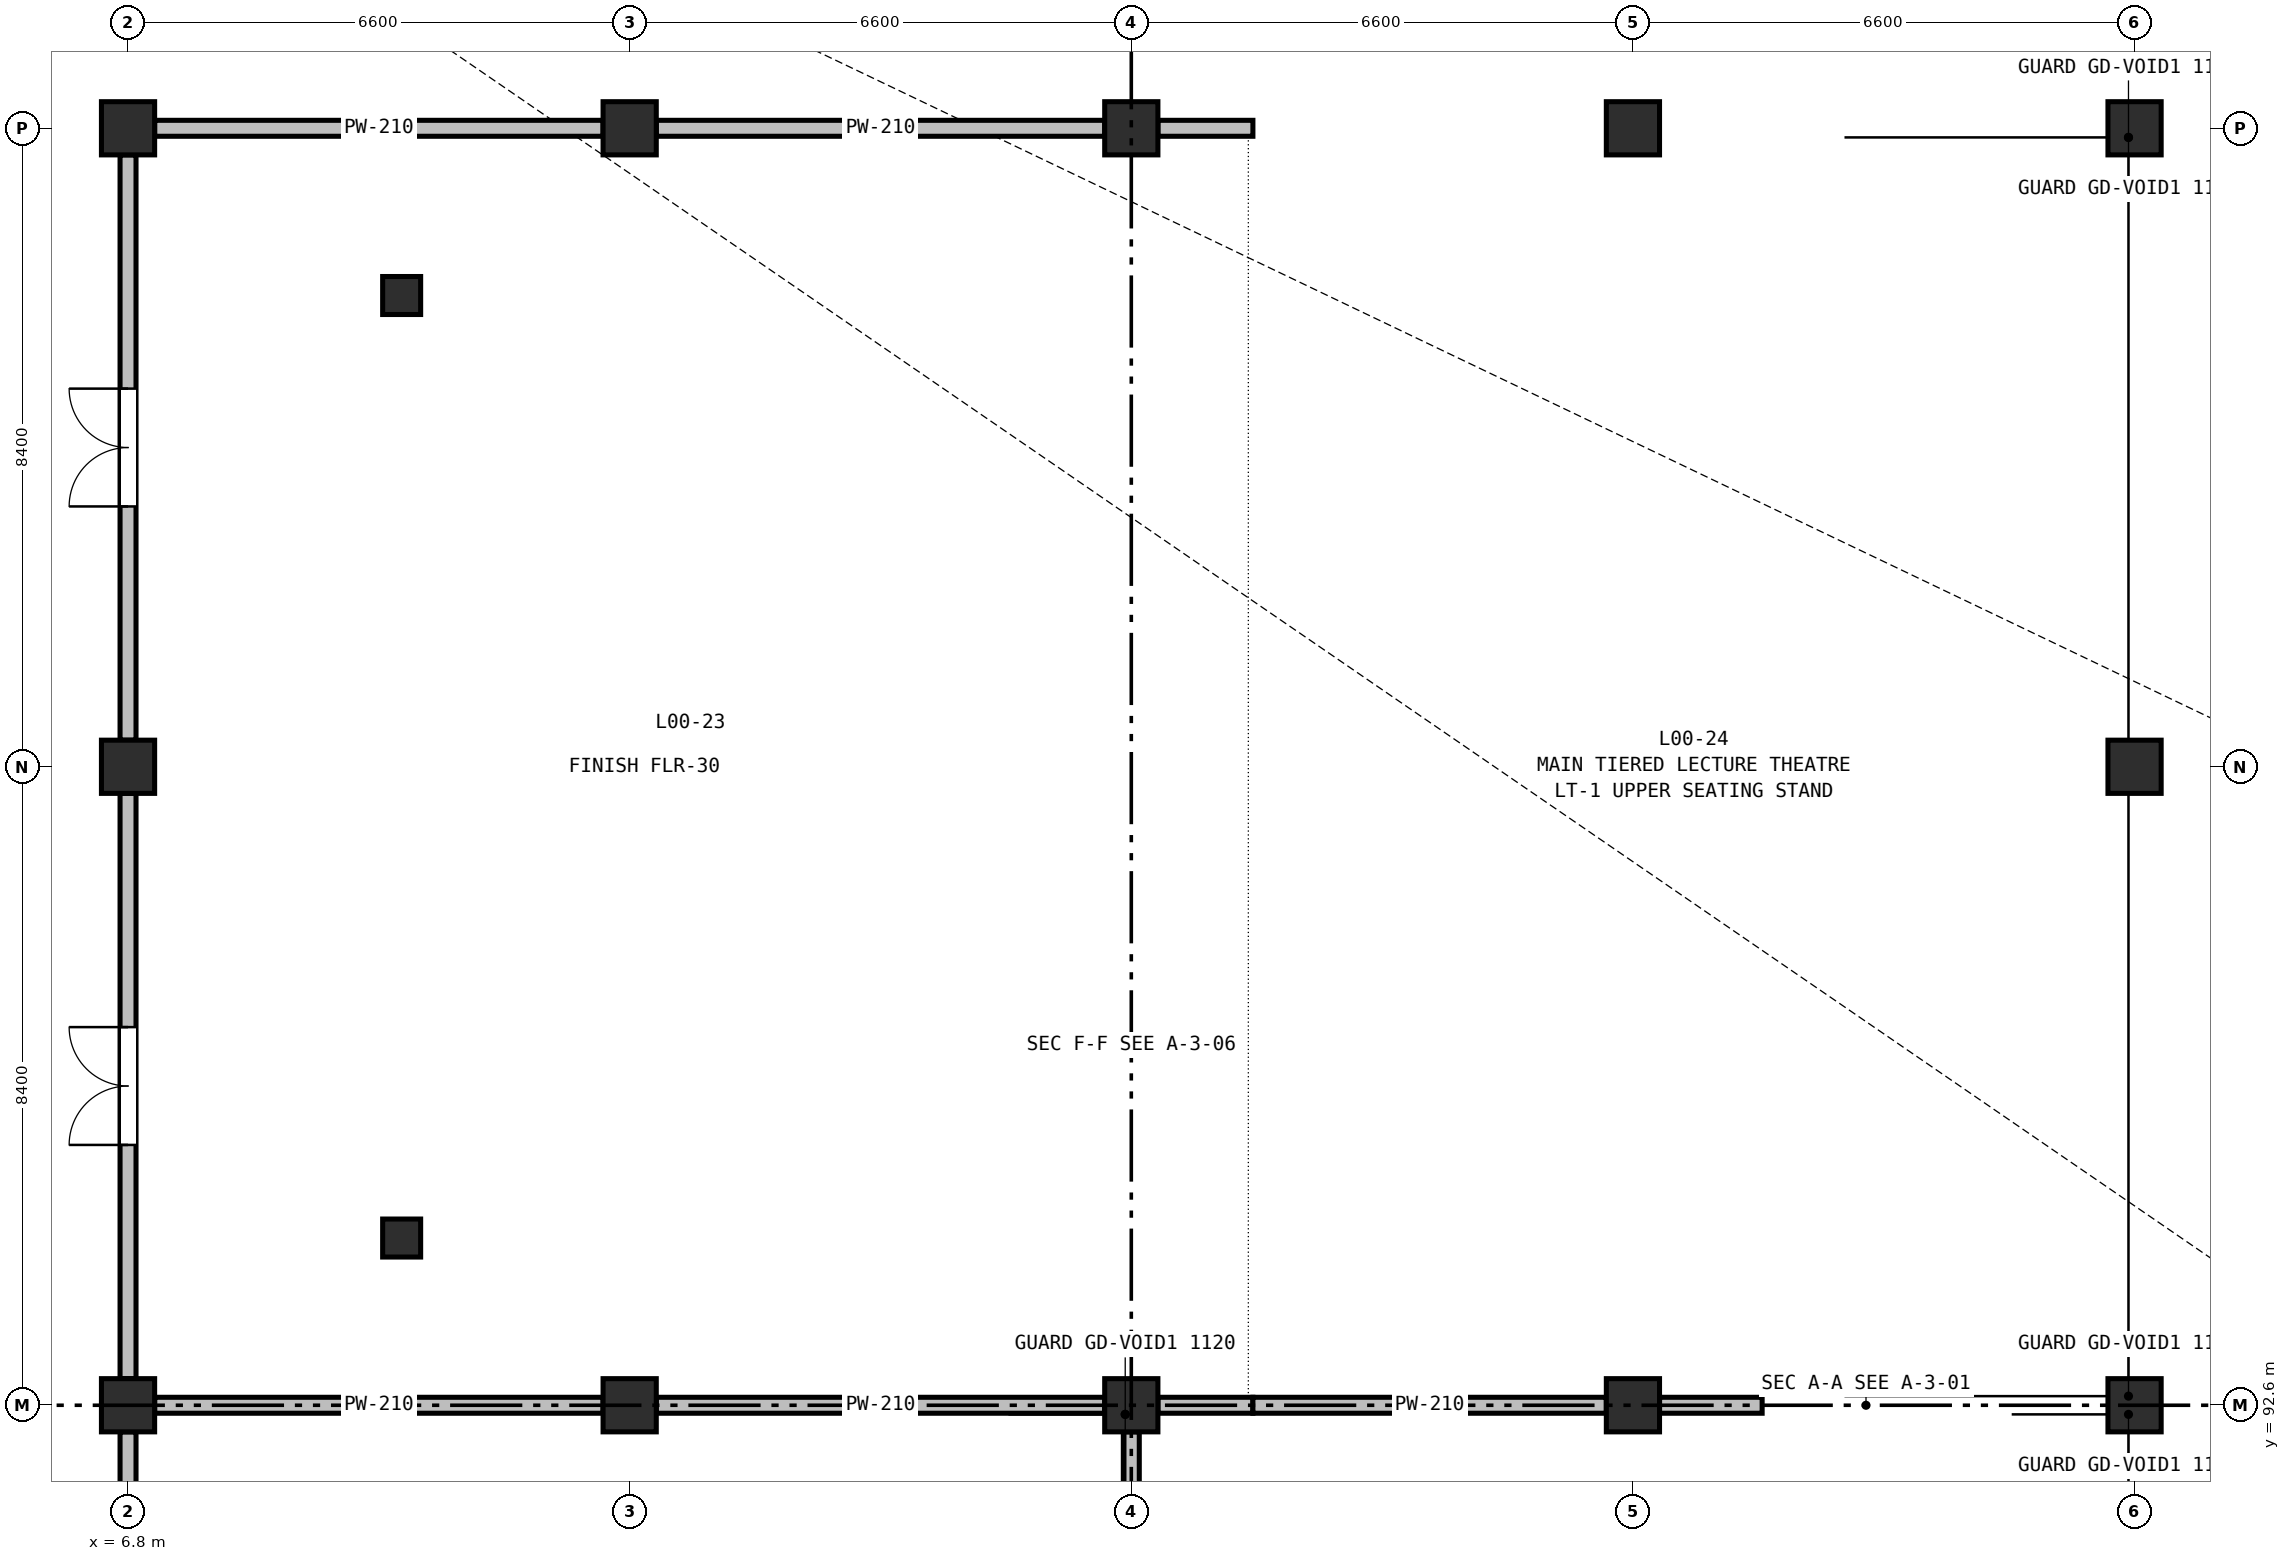
"""IFC4 building model, lengths in metres.
Left out: names, types, materials, properties, quantities, classifications, styles, units other than length and angle.
Written with IfcOpenShell. Run it as: python <this file> out.ifc"""

import sys

from ifc_helpers import new_model, si_unit, direction, frame, frame_2d, origin, origin_2d, place, context, subcontext, project, spatial, rectangle, extrude, element, fill, save


model = new_model("IFC4")
c1 = context("Model", 3, precision=1e-05, world=origin(), true_north=direction((0.0, 1.0)))
c2 = subcontext(c1, "Body", "Model", "MODEL_VIEW")
j1 = project(units=[si_unit("LENGTHUNIT", "METRE"), si_unit("PLANEANGLEUNIT", "RADIAN")], contexts=[c1])
p1 = place(None, origin())
s1 = spatial("IfcSite", under=j1, at=p1, CompositionType="ELEMENT")
p2 = place(p1, origin())
s2 = spatial("IfcBuilding", under=s1, at=p2, CompositionType="ELEMENT")
p3 = place(p2, origin())
s3 = spatial("IfcBuildingStorey", under=s2, at=p3, CompositionType="ELEMENT", Elevation=0.0)
for number, where, z_axis, x_axis in (
    (1, (6.8, 92.6, -0.32), (0.0, 0.0, 1.0), (1.0, 0.0, 0.0)),
    (2, (6.8, 101.0, -0.32), (0.0, 0.0, 1.0), (1.0, 0.0, 0.0)),
    (3, (6.8, 109.4, -0.32), (0.0, 0.0, 1.0), (1.0, 0.0, 0.0)),
    (4, (13.4, 92.6, -0.32), (0.0, 0.0, 1.0), (1.0, 0.0, 0.0)),
    (5, (13.4, 109.4, -0.32), (0.0, 0.0, 1.0), (1.0, 0.0, 0.0)),
    (6, (20.0, 92.6, -0.32), (0.0, 0.0, 1.0), (1.0, 0.0, 0.0)),
    (7, (20.0, 109.4, -0.32), (0.0, 0.0, 1.0), (1.0, 0.0, 0.0)),
    (8, (26.6, 92.6, -0.32), (0.0, 0.0, 1.0), (1.0, 0.0, 0.0)),
    (9, (26.6, 109.4, -0.32), (0.0, 0.0, 1.0), (1.0, 0.0, 0.0)),
    (10, (33.2, 92.6, -0.32), (0.0, 0.0, 1.0), (1.0, 0.0, 0.0)),
    (11, (33.2, 101.0, -0.32), (0.0, 0.0, 1.0), (1.0, 0.0, 0.0)),
    (12, (33.2, 109.4, -0.32), (0.0, 0.0, 1.0), (1.0, 0.0, 0.0)),
):
    element("IfcColumn", number, at=place(p3, frame(where, z_axis=z_axis, x_axis=x_axis)), inside=s3, PredefinedType="COLUMN", context=c2, shape_type="SweptSolid", body=[
        extrude(rectangle(XDim=0.7, YDim=0.7, at=origin_2d()), origin(), (0.0, 0.0, 1.0), 5.72),
    ])
for number, where, z_axis, x_axis in (
    (13, (10.4, 94.8, -0.32), (0.0, 0.0, 1.0), (1.0, 0.0, 0.0)),
    (14, (10.4, 107.2, -0.32), (0.0, 0.0, 1.0), (1.0, 0.0, 0.0)),
):
    element("IfcColumn", number, at=place(p3, frame(where, z_axis=z_axis, x_axis=x_axis)), inside=s3, PredefinedType="COLUMN", context=c2, shape_type="SweptSolid", body=[
        extrude(rectangle(XDim=0.5, YDim=0.5, at=origin_2d()), origin(), (0.0, 0.0, 1.0), 0.77),
    ])
p4 = place(p3, frame((7.15, 109.4, 0.0), z_axis=(0.0, 0.0, 1.0), x_axis=(1.0, 0.0, 0.0)))
e15 = element("IfcWall", 15, at=p4, inside=s3, PredefinedType="PARTITIONING", context=c2, shape_type="SweptSolid", body=[
    extrude(rectangle(XDim=5.9, YDim=0.21, at=frame_2d((2.95, 0.0))), origin(), (0.0, 0.0, 1.0), 4.735),
])
p5 = place(p3, frame((13.75, 109.4, 0.0), z_axis=(0.0, 0.0, 1.0), x_axis=(1.0, 0.0, 0.0)))
e16 = element("IfcWall", 16, at=p5, inside=s3, PredefinedType="PARTITIONING", context=c2, shape_type="SweptSolid", body=[
    extrude(rectangle(XDim=5.9, YDim=0.21, at=frame_2d((2.95, 0.0))), origin(), (0.0, 0.0, 1.0), 4.735),
])
for number, where, z_axis, x_axis in (
    (17, (20.35, 109.4, 0.0), (0.0, 0.0, 1.0), (1.0, 0.0, 0.0)),
    (18, (21.6, 92.6, 0.0), (0.0, 0.0, 1.0), (-1.0, 0.0, 0.0)),
):
    element("IfcWall", number, at=place(p3, frame(where, z_axis=z_axis, x_axis=x_axis)), inside=s3, PredefinedType="PARTITIONING", context=c2, shape_type="SweptSolid", body=[
        extrude(rectangle(XDim=1.25, YDim=0.21, at=frame_2d((0.625, 0.0))), origin(), (0.0, 0.0, 1.0), 4.735),
    ])
p6 = place(p3, frame((19.65, 92.6, 0.0), z_axis=(0.0, 0.0, 1.0), x_axis=(-1.0, 0.0, 0.0)))
e19 = element("IfcWall", 19, at=p6, inside=s3, PredefinedType="PARTITIONING", context=c2, shape_type="SweptSolid", body=[
    extrude(rectangle(XDim=5.9, YDim=0.21, at=frame_2d((2.95, 0.0))), origin(), (0.0, 0.0, 1.0), 4.735),
])
p7 = place(p3, frame((13.05, 92.6, 0.0), z_axis=(0.0, 0.0, 1.0), x_axis=(-1.0, 0.0, 0.0)))
e20 = element("IfcWall", 20, at=p7, inside=s3, PredefinedType="PARTITIONING", context=c2, shape_type="SweptSolid", body=[
    extrude(rectangle(XDim=5.9, YDim=0.21, at=frame_2d((2.95, 0.0))), origin(), (0.0, 0.0, 1.0), 4.735),
])
p8 = place(p3, frame((6.8, 92.95, 0.0), z_axis=(0.0, 0.0, 1.0), x_axis=(0.0, 1.0, 0.0)))
e21 = element("IfcWall", 21, at=p8, inside=s3, PredefinedType="PARTITIONING", context=c2, shape_type="SweptSolid", body=[
    extrude(rectangle(XDim=7.7, YDim=0.21, at=frame_2d((3.85, 0.0))), origin(), (0.0, 0.0, 1.0), 4.535),
])
p9 = place(p8, frame((3.075, 0.0, 0.0)))
e22 = element("IfcOpeningElement", 22, at=p9, cuts=e21, PredefinedType="OPENING", context=c2, shape_type="SweptSolid", body=[
    extrude(rectangle(XDim=1.55, YDim=2.2, at=frame_2d((0.775, 1.1))), frame((0.0, 0.115, 0.0), z_axis=(0.0, -1.0, 0.0), x_axis=(1.0, 0.0, 0.0)), (0.0, 0.0, 1.0), 0.23),
])
p10 = place(p3, frame((6.8, 101.35, 0.0), z_axis=(0.0, 0.0, 1.0), x_axis=(0.0, 1.0, 0.0)))
e23 = element("IfcWall", 23, at=p10, inside=s3, PredefinedType="PARTITIONING", context=c2, shape_type="SweptSolid", body=[
    extrude(rectangle(XDim=7.7, YDim=0.21, at=frame_2d((3.85, 0.0))), origin(), (0.0, 0.0, 1.0), 4.535),
])
p11 = place(p10, frame((3.075, 0.0, 0.0)))
e24 = element("IfcOpeningElement", 24, at=p11, cuts=e23, PredefinedType="OPENING", context=c2, shape_type="SweptSolid", body=[
    extrude(rectangle(XDim=1.55, YDim=2.2, at=frame_2d((0.775, 1.1))), frame((0.0, 0.115, 0.0), z_axis=(0.0, -1.0, 0.0), x_axis=(1.0, 0.0, 0.0)), (0.0, 0.0, 1.0), 0.23),
])
p12 = place(p3, frame((6.8, 84.55, 0.0), z_axis=(0.0, 0.0, 1.0), x_axis=(0.0, 1.0, 0.0)))
e25 = element("IfcWall", 25, at=p12, inside=s3, PredefinedType="PARTITIONING", context=c2, shape_type="SweptSolid", body=[
    extrude(rectangle(XDim=7.7, YDim=0.21, at=frame_2d((3.85, 0.0))), origin(), (0.0, 0.0, 1.0), 4.535),
])
p13 = place(p12, frame((3.075, 0.0, 0.0)))
e26 = element("IfcOpeningElement", 26, at=p13, cuts=e25, PredefinedType="OPENING", context=c2, shape_type="SweptSolid", body=[
    extrude(rectangle(XDim=1.55, YDim=2.2, at=frame_2d((0.775, 1.1))), frame((0.0, 0.115, 0.0), z_axis=(0.0, -1.0, 0.0), x_axis=(1.0, 0.0, 0.0)), (0.0, 0.0, 1.0), 0.23),
])
p14 = place(p3, frame((21.6, 92.6, 0.0), z_axis=(0.0, 0.0, 1.0), x_axis=(1.0, 0.0, 0.0)))
e27 = element("IfcWall", 27, at=p14, inside=s3, PredefinedType="PARTITIONING", context=c2, shape_type="SweptSolid", body=[
    extrude(rectangle(XDim=4.65, YDim=0.21, at=frame_2d((2.325, 0.0))), origin(), (0.0, 0.0, 1.0), 4.735),
])
p15 = place(p3, frame((26.95, 92.6, 0.0), z_axis=(0.0, 0.0, 1.0), x_axis=(1.0, 0.0, 0.0)))
e28 = element("IfcWall", 28, at=p15, inside=s3, PredefinedType="PARTITIONING", context=c2, shape_type="SweptSolid", body=[
    extrude(rectangle(XDim=1.35, YDim=0.21, at=frame_2d((0.675, 0.0))), origin(), (0.0, 0.0, 1.0), 4.735),
])
p16 = place(p3, frame((20.0, 84.55, 0.0), z_axis=(0.0, 0.0, 1.0), x_axis=(0.0, 1.0, 0.0)))
e29 = element("IfcWall", 29, at=p16, inside=s3, PredefinedType="PARTITIONING", context=c2, shape_type="SweptSolid", body=[
    extrude(rectangle(XDim=7.7, YDim=0.21, at=frame_2d((3.85, 0.0))), origin(), (0.0, 0.0, 1.0), 4.535),
])
p17 = place(p11, origin())
e30 = element("IfcDoor", 30, at=p17, inside=s3, OperationType="DOUBLE_DOOR_SINGLE_SWING", PredefinedType="DOOR", context=c2, shape_type="SweptSolid", body=[
    extrude(rectangle(XDim=1.55, YDim=2.2, at=frame_2d((0.775, 1.1))), frame((0.0, 0.025, 0.0), z_axis=(0.0, -1.0, 0.0), x_axis=(1.0, 0.0, 0.0)), (0.0, 0.0, 1.0), 0.05),
])
fill(e24, e30)
p18 = place(p9, origin())
e31 = element("IfcDoor", 31, at=p18, inside=s3, OperationType="DOUBLE_DOOR_SINGLE_SWING", PredefinedType="DOOR", context=c2, shape_type="SweptSolid", body=[
    extrude(rectangle(XDim=1.55, YDim=2.2, at=frame_2d((0.775, 1.1))), frame((0.0, 0.025, 0.0), z_axis=(0.0, -1.0, 0.0), x_axis=(1.0, 0.0, 0.0)), (0.0, 0.0, 1.0), 0.05),
])
fill(e22, e31)
save(model, sys.argv[1])
